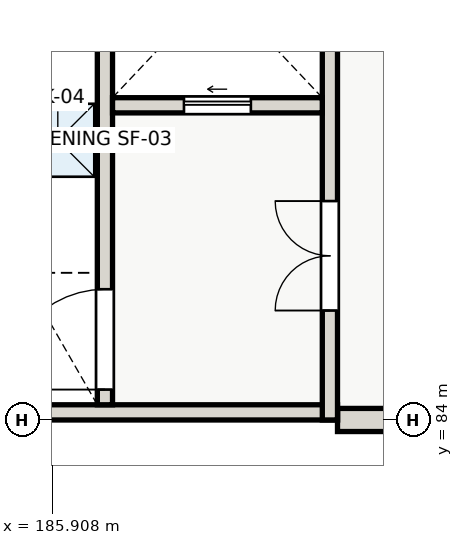
"""IFC4 building model, lengths in metres.
Left out: names, types, materials, properties, quantities, classifications, styles, units other than length and angle.
Written with IfcOpenShell. Run it as: python <this file> out.ifc"""

import sys

from ifc_helpers import new_model, si_unit, direction, frame, frame_2d, origin, origin_2d, place, context, subcontext, project, spatial, rectangle, extrude, element, fill, save


model = new_model("IFC4")
c1 = context("Model", 3, precision=1e-05, world=origin(), true_north=direction((0.0, 1.0)))
c2 = subcontext(c1, "Body", "Model", "MODEL_VIEW")
j1 = project(units=[si_unit("LENGTHUNIT", "METRE"), si_unit("PLANEANGLEUNIT", "RADIAN")], contexts=[c1])
p1 = place(None, origin())
s1 = spatial("IfcSite", under=j1, at=p1, CompositionType="ELEMENT")
p2 = place(p1, origin())
s2 = spatial("IfcBuilding", under=s1, at=p2, CompositionType="ELEMENT")
p3 = place(p2, frame((0.0, 0.0, 12.6)))
s3 = spatial("IfcBuildingStorey", under=s2, at=p3, CompositionType="ELEMENT", Elevation=12.6)
p4 = place(p3, frame((192.0, 84.0, 0.0), z_axis=(0.0, 0.0, 1.0), x_axis=(-1.0, 0.0, 0.0)))
e1 = element("IfcWall", 1, at=p4, inside=s3, PredefinedType="SOLIDWALL", context=c2, shape_type="SweptSolid", body=[
    extrude(rectangle(XDim=1.4, YDim=0.38, at=frame_2d((0.7, 0.0))), origin(), (0.0, 0.0, 1.0), 3.57),
])
p5 = place(p3, frame((190.6, 84.125, 0.0), z_axis=(0.0, 0.0, 1.0), x_axis=(-1.0, 0.0, 0.0)))
e2 = element("IfcWall", 2, at=p5, inside=s3, PredefinedType="SHEAR", context=c2, shape_type="SweptSolid", body=[
    extrude(rectangle(XDim=9.2, YDim=0.25, at=frame_2d((4.6, 0.0))), origin(), (0.0, 0.0, 1.0), 5.6),
])
p6 = place(p3, frame((190.475, 84.0, 0.0), z_axis=(0.0, 0.0, 1.0), x_axis=(0.0, 1.0, 0.0)))
e3 = element("IfcWall", 3, at=p6, inside=s3, PredefinedType="SHEAR", context=c2, shape_type="SweptSolid", body=[
    extrude(rectangle(XDim=9.2, YDim=0.25, at=frame_2d((4.6, 0.0))), origin(), (0.0, 0.0, 1.0), 5.6),
])
p7 = place(p6, frame((1.8, 0.0, 0.0)))
e4 = element("IfcOpeningElement", 4, at=p7, cuts=e3, PredefinedType="OPENING", context=c2, shape_type="SweptSolid", body=[
    extrude(rectangle(XDim=1.8, YDim=2.15, at=frame_2d((0.9, 1.075))), frame((0.0, 0.135, 0.0), z_axis=(0.0, -1.0, 0.0), x_axis=(1.0, 0.0, 0.0)), (0.0, 0.0, 1.0), 0.27),
])
p8 = place(p3, frame((186.775, 84.25, 0.0), z_axis=(0.0, 0.0, 1.0), x_axis=(0.0, 1.0, 0.0)))
e5 = element("IfcWall", 5, at=p8, inside=s3, PredefinedType="SHEAR", context=c2, shape_type="SweptSolid", body=[
    extrude(rectangle(XDim=8.7, YDim=0.25, at=frame_2d((4.35, 0.0))), origin(), (0.0, 0.0, 1.0), 5.6),
])
p9 = place(p8, frame((0.25, 0.0, 0.0)))
e6 = element("IfcOpeningElement", 6, at=p9, cuts=e5, PredefinedType="OPENING", context=c2, shape_type="SweptSolid", body=[
    extrude(rectangle(XDim=1.65, YDim=2.1, at=frame_2d((0.825, 1.05))), frame((0.0, 0.135, 0.0), z_axis=(0.0, -1.0, 0.0), x_axis=(1.0, 0.0, 0.0)), (0.0, 0.0, 1.0), 0.27),
])
p10 = place(p3, frame((186.9, 89.175, 0.0), z_axis=(0.0, 0.0, 1.0), x_axis=(1.0, 0.0, 0.0)))
e7 = element("IfcWall", 7, at=p10, inside=s3, PredefinedType="SHEAR", context=c2, shape_type="SweptSolid", body=[
    extrude(rectangle(XDim=3.45, YDim=0.25, at=frame_2d((1.725, 0.0))), origin(), (0.0, 0.0, 1.0), 5.6),
])
p11 = place(p10, frame((1.175, 0.0, 0.0)))
e8 = element("IfcOpeningElement", 8, at=p11, cuts=e7, PredefinedType="OPENING", context=c2, shape_type="SweptSolid", body=[
    extrude(rectangle(XDim=1.1, YDim=2.1, at=frame_2d((0.55, 1.05))), frame((0.0, 0.135, 0.0), z_axis=(0.0, -1.0, 0.0), x_axis=(1.0, 0.0, 0.0)), (0.0, 0.0, 1.0), 0.27),
])
p12 = place(p2, frame((0.0, 0.0, 21.0)))
p13 = place(p12, frame((0.0, 0.0, -3.02)))
p14 = place(p13, frame((186.0, 88.6, 0.0)))
p15 = place(p14, frame((0.0, 0.0, 0.16)))
e9 = element("IfcWindow", 9, at=p15, inside=s3, PartitioningType="SINGLE_PANEL", PredefinedType="SKYLIGHT", context=c2, shape_type="SweptSolid", body=[
    extrude(rectangle(XDim=1.2, YDim=1.2, at=origin_2d()), origin(), (0.0, 0.0, 1.0), 0.06),
])
p16 = place(p7, origin())
e10 = element("IfcDoor", 10, at=p16, inside=s3, OperationType="DOUBLE_DOOR_SINGLE_SWING", PredefinedType="DOOR", context=c2, shape_type="SweptSolid", body=[
    extrude(rectangle(XDim=1.8, YDim=2.15, at=frame_2d((0.9, 1.075))), frame((0.0, 0.025, 0.0), z_axis=(0.0, -1.0, 0.0), x_axis=(1.0, 0.0, 0.0)), (0.0, 0.0, 1.0), 0.05),
])
fill(e4, e10)
p17 = place(p9, origin())
e11 = element("IfcDoor", 11, at=p17, inside=s3, OperationType="SINGLE_SWING_LEFT", PredefinedType="DOOR", context=c2, shape_type="SweptSolid", body=[
    extrude(rectangle(XDim=1.65, YDim=2.1, at=frame_2d((0.825, 1.05))), frame((0.0, 0.025, 0.0), z_axis=(0.0, -1.0, 0.0), x_axis=(1.0, 0.0, 0.0)), (0.0, 0.0, 1.0), 0.05),
])
fill(e6, e11)
p18 = place(p11, origin())
e12 = element("IfcDoor", 12, at=p18, inside=s3, OperationType="SLIDING_TO_LEFT", PredefinedType="DOOR", context=c2, shape_type="SweptSolid", body=[
    extrude(rectangle(XDim=1.1, YDim=2.1, at=frame_2d((0.55, 1.05))), frame((0.0, 0.025, 0.0), z_axis=(0.0, -1.0, 0.0), x_axis=(1.0, 0.0, 0.0)), (0.0, 0.0, 1.0), 0.05),
])
fill(e8, e12)
save(model, sys.argv[1])
